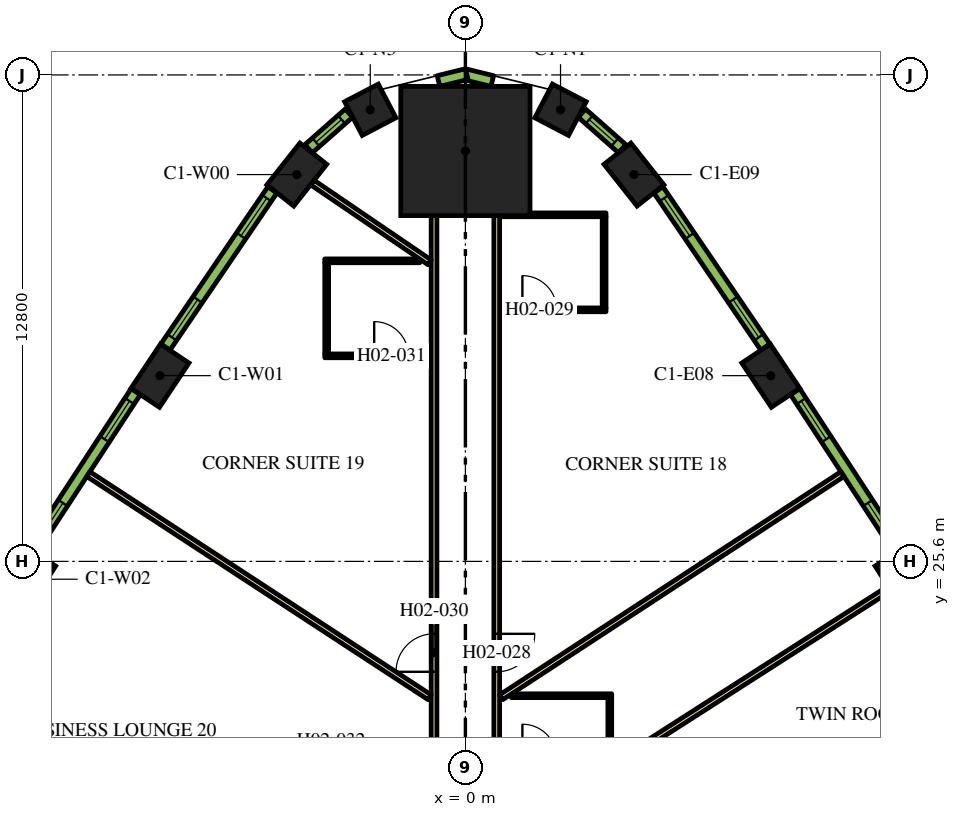
"""IFC4 building model, lengths in metres.
Left out: names, types, materials, properties, quantities, classifications, styles, units other than length and angle.
Written with IfcOpenShell. Run it as: python <this file> out.ifc"""

import sys

from ifc_helpers import new_model, si_unit, direction, frame, frame_2d, origin, origin_2d, place, context, subcontext, project, spatial, rectangle, extrude, element, fill, save


model = new_model("IFC4")
c1 = context("Model", 3, precision=1e-05, world=origin(), true_north=direction((0.0, 1.0)))
c2 = subcontext(c1, "Body", "Model", "MODEL_VIEW")
j1 = project(units=[si_unit("LENGTHUNIT", "METRE"), si_unit("PLANEANGLEUNIT", "RADIAN")], contexts=[c1])
p1 = place(None, origin())
s1 = spatial("IfcSite", under=j1, at=p1, CompositionType="ELEMENT")
p2 = place(p1, origin())
s2 = spatial("IfcBuilding", under=s1, at=p2, CompositionType="ELEMENT")
p3 = place(p2, frame((0.0, 0.0, 47.1)))
s3 = spatial("IfcBuildingStorey", under=s2, at=p3, CompositionType="ELEMENT", Elevation=47.1)
p4 = place(p3, frame((0.0, 36.399, 0.0), z_axis=(0.0, 0.0, 1.0), x_axis=(0.0, 1.0, 0.0)))
e1 = element("IfcColumn", 1, at=p4, inside=s3, PredefinedType="COLUMN", context=c2, shape_type="SweptSolid", body=[
    extrude(rectangle(XDim=3.4, YDim=3.4, at=origin_2d()), origin(), (0.0, 0.0, 1.0), 3.9),
])
for number, where, z_axis, x_axis in (
    (2, (11.539, 25.131, 0.0), (0.0, 0.0, 1.0), (-0.539, 0.842, 0.0)),
    (3, (8.037, 30.487, 0.0), (0.0, 0.0, 1.0), (-0.555, 0.832, 0.0)),
    (4, (4.436, 35.778, 0.0), (0.0, 0.0, 1.0), (-0.62, 0.784, 0.0)),
):
    element("IfcColumn", number, at=place(p3, frame(where, z_axis=z_axis, x_axis=x_axis)), inside=s3, PredefinedType="COLUMN", context=c2, shape_type="SweptSolid", body=[
        extrude(rectangle(XDim=1.4, YDim=0.9, at=origin_2d()), origin(), (0.0, 0.0, 1.0), 3.9),
    ])
for number, where, z_axis, x_axis in (
    (5, (2.503, 37.484, 0.0), (0.0, 0.0, 1.0), (-0.886, 0.464, 0.0)),
    (6, (-2.503, 37.484, 0.0), (0.0, 0.0, 1.0), (-0.886, -0.464, 0.0)),
):
    element("IfcColumn", number, at=place(p3, frame(where, z_axis=z_axis, x_axis=x_axis)), inside=s3, PredefinedType="COLUMN", context=c2, shape_type="SweptSolid", body=[
        extrude(rectangle(XDim=1.0, YDim=1.0, at=origin_2d()), origin(), (0.0, 0.0, 1.0), 3.9),
    ])
for number, where, z_axis, x_axis in (
    (7, (-4.436, 35.778, 0.0), (0.0, 0.0, 1.0), (-0.62, -0.784, 0.0)),
    (8, (-8.037, 30.487, 0.0), (0.0, 0.0, 1.0), (-0.555, -0.832, 0.0)),
    (9, (-11.539, 25.131, 0.0), (0.0, 0.0, 1.0), (-0.539, -0.842, 0.0)),
):
    element("IfcColumn", number, at=place(p3, frame(where, z_axis=z_axis, x_axis=x_axis)), inside=s3, PredefinedType="COLUMN", context=c2, shape_type="SweptSolid", body=[
        extrude(rectangle(XDim=1.4, YDim=0.9, at=origin_2d()), origin(), (0.0, 0.0, 1.0), 3.9),
    ])
p5 = place(p3, frame((0.825, 34.699, 0.0), z_axis=(0.0, 0.0, 1.0), x_axis=(0.0, -1.0, 0.0)))
e10 = element("IfcWall", 10, at=p5, inside=s3, PredefinedType="PARTITIONING", context=c2, shape_type="SweptSolid", body=[
    extrude(rectangle(XDim=16.144, YDim=0.15, at=frame_2d((8.072, 0.0))), origin(), (0.0, 0.0, 1.0), 2.75),
])
p6 = place(p5, frame((14.714, 0.0, 0.0)))
e11 = element("IfcOpeningElement", 11, at=p6, cuts=e10, PredefinedType="OPENING", context=c2, shape_type="SweptSolid", body=[
    extrude(rectangle(XDim=1.0, YDim=2.1, at=frame_2d((0.5, 1.05))), frame((0.0, 0.085, 0.0), z_axis=(0.0, -1.0, 0.0), x_axis=(1.0, 0.0, 0.0)), (0.0, 0.0, 1.0), 0.17),
])
p7 = place(p5, frame((11.005, 0.0, 0.0)))
e12 = element("IfcOpeningElement", 12, at=p7, cuts=e10, PredefinedType="OPENING", context=c2, shape_type="SweptSolid", body=[
    extrude(rectangle(XDim=1.0, YDim=2.1, at=frame_2d((0.5, 1.05))), frame((0.0, 0.085, 0.0), z_axis=(0.0, -1.0, 0.0), x_axis=(1.0, 0.0, 0.0)), (0.0, 0.0, 1.0), 0.17),
])
p8 = place(p3, frame((-0.825, 18.475, 0.0), z_axis=(0.0, 0.0, 1.0), x_axis=(0.0, 1.0, 0.0)))
e13 = element("IfcWall", 13, at=p8, inside=s3, PredefinedType="PARTITIONING", context=c2, shape_type="SweptSolid", body=[
    extrude(rectangle(XDim=16.224, YDim=0.15, at=frame_2d((8.112, 0.0))), origin(), (0.0, 0.0, 1.0), 2.75),
])
p9 = place(p8, frame((4.22, 0.0, 0.0)))
e14 = element("IfcOpeningElement", 14, at=p9, cuts=e13, PredefinedType="OPENING", context=c2, shape_type="SweptSolid", body=[
    extrude(rectangle(XDim=1.0, YDim=2.1, at=frame_2d((0.5, 1.05))), frame((0.0, 0.085, 0.0), z_axis=(0.0, -1.0, 0.0), x_axis=(1.0, 0.0, 0.0)), (0.0, 0.0, 1.0), 0.17),
])
p10 = place(p3, frame((-9.922, 27.896, 0.0), z_axis=(0.0, 0.0, 1.0), x_axis=(0.836970816595, -0.547247523675, 0.0)))
e15 = element("IfcWall", 15, at=p10, inside=s3, PredefinedType="PARTITIONING", context=c2, shape_type="SweptSolid", body=[
    extrude(rectangle(XDim=10.729, YDim=0.15, at=frame_2d((5.364, 0.0))), origin(), (0.0, 0.0, 1.0), 2.75),
])
p11 = place(p3, frame((-4.028, 35.569, 0.0), z_axis=(0.0, 0.0, 1.0), x_axis=(0.826730622998, -0.562597971021, 0.0)))
e16 = element("IfcWall", 16, at=p11, inside=s3, PredefinedType="PARTITIONING", context=c2, shape_type="SweptSolid", body=[
    extrude(rectangle(XDim=3.733, YDim=0.15, at=frame_2d((1.867, 0.0))), origin(), (0.0, 0.0, 1.0), 2.75),
])
p12 = place(p3, frame((9.922, 27.896, 0.0), z_axis=(0.0, 0.0, 1.0), x_axis=(-0.836970816595, -0.547247523675, 0.0)))
e17 = element("IfcWall", 17, at=p12, inside=s3, PredefinedType="PARTITIONING", context=c2, shape_type="SweptSolid", body=[
    extrude(rectangle(XDim=10.729, YDim=0.15, at=frame_2d((5.364, 0.0))), origin(), (0.0, 0.0, 1.0), 2.75),
])
p13 = place(p3, frame((11.16, 24.888, 0.0), z_axis=(0.0, 0.0, 1.0), x_axis=(-0.84199813156, -0.539480441211, 0.0)))
e18 = element("IfcWall", 18, at=p13, inside=s3, PredefinedType="PARTITIONING", context=c2, shape_type="SweptSolid", body=[
    extrude(rectangle(XDim=11.638, YDim=0.15, at=frame_2d((5.819, 0.0))), origin(), (0.0, 0.0, 1.0), 2.75),
])
p14 = place(p3, frame((3.8, 20.466, 0.0), z_axis=(0.0, 0.0, 1.0), x_axis=(0.0, 1.0, 0.0)))
e19 = element("IfcWall", 19, at=p14, inside=s3, PredefinedType="PARTITIONING", context=c2, shape_type="SweptSolid", body=[
    extrude(rectangle(XDim=1.55, YDim=0.1, at=frame_2d((0.775, 0.0))), origin(), (0.0, 0.0, 1.0), 2.75),
])
p15 = place(p3, frame((1.21, 22.066, 0.0), z_axis=(0.0, 0.0, 1.0), x_axis=(1.0, 0.0, 0.0)))
e20 = element("IfcWall", 20, at=p15, inside=s3, PredefinedType="PARTITIONING", context=c2, shape_type="SweptSolid", body=[
    extrude(rectangle(XDim=2.64, YDim=0.1, at=frame_2d((1.32, 0.0))), origin(), (0.0, 0.0, 1.0), 2.75),
])
p16 = place(p3, frame((0.9, 32.219, 0.0), z_axis=(0.0, 0.0, 1.0), x_axis=(1.0, 0.0, 0.0)))
e21 = element("IfcWall", 21, at=p16, inside=s3, PredefinedType="PARTITIONING", context=c2, shape_type="SweptSolid", body=[
    extrude(rectangle(XDim=2.8, YDim=0.1, at=frame_2d((1.4, 0.0))), origin(), (0.0, 0.0, 1.0), 2.75),
])
p17 = place(p16, frame((0.6, 0.0, 0.0)))
e22 = element("IfcOpeningElement", 22, at=p17, cuts=e21, PredefinedType="OPENING", context=c2, shape_type="SweptSolid", body=[
    extrude(rectangle(XDim=0.9, YDim=2.1, at=frame_2d((0.45, 1.05))), frame((0.0, 0.06, 0.0), z_axis=(0.0, -1.0, 0.0), x_axis=(1.0, 0.0, 0.0)), (0.0, 0.0, 1.0), 0.12),
])
p18 = place(p3, frame((3.65, 32.269, 0.0), z_axis=(0.0, 0.0, 1.0), x_axis=(0.0, 1.0, 0.0)))
e23 = element("IfcWall", 23, at=p18, inside=s3, PredefinedType="PARTITIONING", context=c2, shape_type="SweptSolid", body=[
    extrude(rectangle(XDim=2.4, YDim=0.1, at=frame_2d((1.2, 0.0))), origin(), (0.0, 0.0, 1.0), 2.75),
])
p19 = place(p3, frame((0.9, 34.719, 0.0), z_axis=(0.0, 0.0, 1.0), x_axis=(1.0, 0.0, 0.0)))
e24 = element("IfcWall", 24, at=p19, inside=s3, PredefinedType="PARTITIONING", context=c2, shape_type="SweptSolid", body=[
    extrude(rectangle(XDim=2.8, YDim=0.1, at=frame_2d((1.4, 0.0))), origin(), (0.0, 0.0, 1.0), 2.75),
])
p20 = place(p3, frame((-3.7, 31.009, 0.0), z_axis=(0.0, 0.0, 1.0), x_axis=(1.0, 0.0, 0.0)))
e25 = element("IfcWall", 25, at=p20, inside=s3, PredefinedType="PARTITIONING", context=c2, shape_type="SweptSolid", body=[
    extrude(rectangle(XDim=2.8, YDim=0.1, at=frame_2d((1.4, 0.0))), origin(), (0.0, 0.0, 1.0), 2.75),
])
p21 = place(p20, frame((1.3, 0.0, 0.0)))
e26 = element("IfcOpeningElement", 26, at=p21, cuts=e25, PredefinedType="OPENING", context=c2, shape_type="SweptSolid", body=[
    extrude(rectangle(XDim=0.9, YDim=2.1, at=frame_2d((0.45, 1.05))), frame((0.0, 0.06, 0.0), z_axis=(0.0, -1.0, 0.0), x_axis=(1.0, 0.0, 0.0)), (0.0, 0.0, 1.0), 0.12),
])
p22 = place(p3, frame((-3.65, 31.059, 0.0), z_axis=(0.0, 0.0, 1.0), x_axis=(0.0, 1.0, 0.0)))
e27 = element("IfcWall", 27, at=p22, inside=s3, PredefinedType="PARTITIONING", context=c2, shape_type="SweptSolid", body=[
    extrude(rectangle(XDim=2.4, YDim=0.1, at=frame_2d((1.2, 0.0))), origin(), (0.0, 0.0, 1.0), 2.75),
])
p23 = place(p3, frame((-1.2, 33.509, 0.0), z_axis=(0.0, 0.0, 1.0), x_axis=(-1.0, 0.0, 0.0)))
e28 = element("IfcWall", 28, at=p23, inside=s3, PredefinedType="PARTITIONING", context=c2, shape_type="SweptSolid", body=[
    extrude(rectangle(XDim=2.5, YDim=0.1, at=frame_2d((1.25, 0.0))), origin(), (0.0, 0.0, 1.0), 2.75),
])
p24 = place(p3, frame((11.411, 25.884, 0.0), z_axis=(0.0, 0.0, 1.0), x_axis=(-0.547204617628, 0.836998868845, 0.0)))
e29 = element("IfcWall", 29, at=p24, inside=s3, PredefinedType="SOLIDWALL", context=c2, shape_type="SweptSolid", body=[
    extrude(rectangle(XDim=4.998, YDim=0.29, at=frame_2d((2.499, 0.0))), origin(), (0.0, 0.0, 1.0), 3.65),
])
p25 = place(p24, frame((0.297, 0.0, 0.9)))
e30 = element("IfcOpeningElement", 30, at=p25, cuts=e29, PredefinedType="OPENING", context=c2, shape_type="SweptSolid", body=[
    extrude(rectangle(XDim=1.2, YDim=2.15, at=frame_2d((0.6, 1.075))), frame((0.0, 0.155, 0.0), z_axis=(0.0, -1.0, 0.0), x_axis=(1.0, 0.0, 0.0)), (0.0, 0.0, 1.0), 0.31),
])
p26 = place(p24, frame((3.501, 0.0, 0.9)))
e31 = element("IfcOpeningElement", 31, at=p26, cuts=e29, PredefinedType="OPENING", context=c2, shape_type="SweptSolid", body=[
    extrude(rectangle(XDim=1.2, YDim=2.15, at=frame_2d((0.6, 1.075))), frame((0.0, 0.155, 0.0), z_axis=(0.0, -1.0, 0.0), x_axis=(1.0, 0.0, 0.0)), (0.0, 0.0, 1.0), 0.31),
])
p27 = place(p3, frame((7.895, 31.238, 0.0), z_axis=(0.0, 0.0, 1.0), x_axis=(-0.562610153679, 0.826722332454, 0.0)))
e32 = element("IfcWall", 32, at=p27, inside=s3, PredefinedType="SOLIDWALL", context=c2, shape_type="SweptSolid", body=[
    extrude(rectangle(XDim=5.006, YDim=0.29, at=frame_2d((2.503, 0.0))), origin(), (0.0, 0.0, 1.0), 3.65),
])
p28 = place(p27, frame((0.31, 0.0, 0.9)))
e33 = element("IfcOpeningElement", 33, at=p28, cuts=e32, PredefinedType="OPENING", context=c2, shape_type="SweptSolid", body=[
    extrude(rectangle(XDim=1.2, YDim=2.15, at=frame_2d((0.6, 1.075))), frame((0.0, 0.155, 0.0), z_axis=(0.0, -1.0, 0.0), x_axis=(1.0, 0.0, 0.0)), (0.0, 0.0, 1.0), 0.31),
])
p29 = place(p27, frame((3.541, 0.0, 0.9)))
e34 = element("IfcOpeningElement", 34, at=p29, cuts=e32, PredefinedType="OPENING", context=c2, shape_type="SweptSolid", body=[
    extrude(rectangle(XDim=1.2, YDim=2.15, at=frame_2d((0.6, 1.075))), frame((0.0, 0.155, 0.0), z_axis=(0.0, -1.0, 0.0), x_axis=(1.0, 0.0, 0.0)), (0.0, 0.0, 1.0), 0.31),
])
p30 = place(p3, frame((4.125, 36.459, 0.0), z_axis=(0.0, 0.0, 1.0), x_axis=(-0.749812680302, 0.661650167731, 0.0)))
e35 = element("IfcWall", 35, at=p30, inside=s3, PredefinedType="SOLIDWALL", context=c2, shape_type="SweptSolid", body=[
    extrude(rectangle(XDim=1.415, YDim=0.29, at=frame_2d((0.708, 0.0))), origin(), (0.0, 0.0, 1.0), 3.65),
])
p31 = place(p30, frame((0.258, 0.0, 0.9)))
e36 = element("IfcOpeningElement", 36, at=p31, cuts=e35, PredefinedType="OPENING", context=c2, shape_type="SweptSolid", body=[
    extrude(rectangle(XDim=0.9, YDim=2.15, at=frame_2d((0.45, 1.075))), frame((0.0, 0.155, 0.0), z_axis=(0.0, -1.0, 0.0), x_axis=(1.0, 0.0, 0.0)), (0.0, 0.0, 1.0), 0.31),
])
for number, where, z_axis, x_axis in (
    (37, (0.707, 38.239, 0.0), (0.0, 0.0, 1.0), (-0.971, 0.238, 0.0)),
    (38, (0.035, 38.421, 0.0), (0.0, 0.0, 1.0), (-0.971, -0.238, 0.0)),
):
    element("IfcWall", number, at=place(p3, frame(where, z_axis=z_axis, x_axis=x_axis)), inside=s3, PredefinedType="SOLIDWALL", context=c2, shape_type="SweptSolid", body=[
        extrude(rectangle(XDim=0.764, YDim=0.29, at=frame_2d((0.382, 0.0))), origin(), (0.0, 0.0, 1.0), 3.65),
    ])
p32 = place(p3, frame((-3.064, 37.395, 0.0), z_axis=(0.0, 0.0, 1.0), x_axis=(-0.749812680302, -0.661650167731, 0.0)))
e39 = element("IfcWall", 39, at=p32, inside=s3, PredefinedType="SOLIDWALL", context=c2, shape_type="SweptSolid", body=[
    extrude(rectangle(XDim=1.415, YDim=0.29, at=frame_2d((0.708, 0.0))), origin(), (0.0, 0.0, 1.0), 3.65),
])
p33 = place(p32, frame((0.258, 0.0, 0.9)))
e40 = element("IfcOpeningElement", 40, at=p33, cuts=e39, PredefinedType="OPENING", context=c2, shape_type="SweptSolid", body=[
    extrude(rectangle(XDim=0.9, YDim=2.15, at=frame_2d((0.45, 1.075))), frame((0.0, 0.155, 0.0), z_axis=(0.0, -1.0, 0.0), x_axis=(1.0, 0.0, 0.0)), (0.0, 0.0, 1.0), 0.31),
])
p34 = place(p3, frame((-5.078, 35.376, 0.0), z_axis=(0.0, 0.0, 1.0), x_axis=(-0.562610153679, -0.826722332454, 0.0)))
e41 = element("IfcWall", 41, at=p34, inside=s3, PredefinedType="SOLIDWALL", context=c2, shape_type="SweptSolid", body=[
    extrude(rectangle(XDim=5.006, YDim=0.29, at=frame_2d((2.503, 0.0))), origin(), (0.0, 0.0, 1.0), 3.65),
])
p35 = place(p34, frame((0.265, 0.0, 0.9)))
e42 = element("IfcOpeningElement", 42, at=p35, cuts=e41, PredefinedType="OPENING", context=c2, shape_type="SweptSolid", body=[
    extrude(rectangle(XDim=1.2, YDim=2.15, at=frame_2d((0.6, 1.075))), frame((0.0, 0.155, 0.0), z_axis=(0.0, -1.0, 0.0), x_axis=(1.0, 0.0, 0.0)), (0.0, 0.0, 1.0), 0.31),
])
p36 = place(p34, frame((3.495, 0.0, 0.9)))
e43 = element("IfcOpeningElement", 43, at=p36, cuts=e41, PredefinedType="OPENING", context=c2, shape_type="SweptSolid", body=[
    extrude(rectangle(XDim=1.2, YDim=2.15, at=frame_2d((0.6, 1.075))), frame((0.0, 0.155, 0.0), z_axis=(0.0, -1.0, 0.0), x_axis=(1.0, 0.0, 0.0)), (0.0, 0.0, 1.0), 0.31),
])
p37 = place(p3, frame((-8.676, 30.068, 0.0), z_axis=(0.0, 0.0, 1.0), x_axis=(-0.547204617628, -0.836998868845, 0.0)))
e44 = element("IfcWall", 44, at=p37, inside=s3, PredefinedType="SOLIDWALL", context=c2, shape_type="SweptSolid", body=[
    extrude(rectangle(XDim=4.998, YDim=0.29, at=frame_2d((2.499, 0.0))), origin(), (0.0, 0.0, 1.0), 3.65),
])
p38 = place(p37, frame((0.297, 0.0, 0.9)))
e45 = element("IfcOpeningElement", 45, at=p38, cuts=e44, PredefinedType="OPENING", context=c2, shape_type="SweptSolid", body=[
    extrude(rectangle(XDim=1.2, YDim=2.15, at=frame_2d((0.6, 1.075))), frame((0.0, 0.155, 0.0), z_axis=(0.0, -1.0, 0.0), x_axis=(1.0, 0.0, 0.0)), (0.0, 0.0, 1.0), 0.31),
])
p39 = place(p37, frame((3.501, 0.0, 0.9)))
e46 = element("IfcOpeningElement", 46, at=p39, cuts=e44, PredefinedType="OPENING", context=c2, shape_type="SweptSolid", body=[
    extrude(rectangle(XDim=1.2, YDim=2.15, at=frame_2d((0.6, 1.075))), frame((0.0, 0.155, 0.0), z_axis=(0.0, -1.0, 0.0), x_axis=(1.0, 0.0, 0.0)), (0.0, 0.0, 1.0), 0.31),
])
p40 = place(p7, origin())
e47 = element("IfcDoor", 47, at=p40, inside=s3, OperationType="SINGLE_SWING_RIGHT", PredefinedType="DOOR", context=c2, shape_type="SweptSolid", body=[
    extrude(rectangle(XDim=1.0, YDim=2.1, at=frame_2d((0.5, 1.05))), frame((0.0, 0.025, 0.0), z_axis=(0.0, -1.0, 0.0), x_axis=(1.0, 0.0, 0.0)), (0.0, 0.0, 1.0), 0.05),
])
fill(e12, e47)
p41 = place(p17, origin())
e48 = element("IfcDoor", 48, at=p41, inside=s3, OperationType="SINGLE_SWING_RIGHT", PredefinedType="DOOR", context=c2, shape_type="SweptSolid", body=[
    extrude(rectangle(XDim=0.9, YDim=2.1, at=frame_2d((0.45, 1.05))), frame((0.0, 0.025, 0.0), z_axis=(0.0, -1.0, 0.0), x_axis=(1.0, 0.0, 0.0)), (0.0, 0.0, 1.0), 0.05),
])
fill(e22, e48)
p42 = place(p9, origin())
e49 = element("IfcDoor", 49, at=p42, inside=s3, OperationType="SINGLE_SWING_LEFT", PredefinedType="DOOR", context=c2, shape_type="SweptSolid", body=[
    extrude(rectangle(XDim=1.0, YDim=2.1, at=frame_2d((0.5, 1.05))), frame((0.0, 0.025, 0.0), z_axis=(0.0, -1.0, 0.0), x_axis=(1.0, 0.0, 0.0)), (0.0, 0.0, 1.0), 0.05),
])
fill(e14, e49)
p43 = place(p21, origin())
e50 = element("IfcDoor", 50, at=p43, inside=s3, OperationType="SINGLE_SWING_LEFT", PredefinedType="DOOR", context=c2, shape_type="SweptSolid", body=[
    extrude(rectangle(XDim=0.9, YDim=2.1, at=frame_2d((0.45, 1.05))), frame((0.0, 0.025, 0.0), z_axis=(0.0, -1.0, 0.0), x_axis=(1.0, 0.0, 0.0)), (0.0, 0.0, 1.0), 0.05),
])
fill(e26, e50)
p44 = place(p25, origin())
e51 = element("IfcWindow", 51, at=p44, inside=s3, PartitioningType="DOUBLE_PANEL_VERTICAL", PredefinedType="WINDOW", context=c2, shape_type="SweptSolid", body=[
    extrude(rectangle(XDim=1.2, YDim=2.15, at=frame_2d((0.6, 1.075))), frame((0.0, 0.015, 0.0), z_axis=(0.0, -1.0, 0.0), x_axis=(1.0, 0.0, 0.0)), (0.0, 0.0, 1.0), 0.06),
])
fill(e30, e51)
p45 = place(p26, origin())
e52 = element("IfcWindow", 52, at=p45, inside=s3, PartitioningType="DOUBLE_PANEL_VERTICAL", PredefinedType="WINDOW", context=c2, shape_type="SweptSolid", body=[
    extrude(rectangle(XDim=1.2, YDim=2.15, at=frame_2d((0.6, 1.075))), frame((0.0, 0.015, 0.0), z_axis=(0.0, -1.0, 0.0), x_axis=(1.0, 0.0, 0.0)), (0.0, 0.0, 1.0), 0.06),
])
fill(e31, e52)
p46 = place(p28, origin())
e53 = element("IfcWindow", 53, at=p46, inside=s3, PartitioningType="DOUBLE_PANEL_VERTICAL", PredefinedType="WINDOW", context=c2, shape_type="SweptSolid", body=[
    extrude(rectangle(XDim=1.2, YDim=2.15, at=frame_2d((0.6, 1.075))), frame((0.0, 0.015, 0.0), z_axis=(0.0, -1.0, 0.0), x_axis=(1.0, 0.0, 0.0)), (0.0, 0.0, 1.0), 0.06),
])
fill(e33, e53)
p47 = place(p29, origin())
e54 = element("IfcWindow", 54, at=p47, inside=s3, PartitioningType="DOUBLE_PANEL_VERTICAL", PredefinedType="WINDOW", context=c2, shape_type="SweptSolid", body=[
    extrude(rectangle(XDim=1.2, YDim=2.15, at=frame_2d((0.6, 1.075))), frame((0.0, 0.015, 0.0), z_axis=(0.0, -1.0, 0.0), x_axis=(1.0, 0.0, 0.0)), (0.0, 0.0, 1.0), 0.06),
])
fill(e34, e54)
p48 = place(p31, origin())
e55 = element("IfcWindow", 55, at=p48, inside=s3, PartitioningType="SINGLE_PANEL", PredefinedType="WINDOW", context=c2, shape_type="SweptSolid", body=[
    extrude(rectangle(XDim=0.9, YDim=2.15, at=frame_2d((0.45, 1.075))), frame((0.0, 0.015, 0.0), z_axis=(0.0, -1.0, 0.0), x_axis=(1.0, 0.0, 0.0)), (0.0, 0.0, 1.0), 0.06),
])
fill(e36, e55)
p49 = place(p33, origin())
e56 = element("IfcWindow", 56, at=p49, inside=s3, PartitioningType="SINGLE_PANEL", PredefinedType="WINDOW", context=c2, shape_type="SweptSolid", body=[
    extrude(rectangle(XDim=0.9, YDim=2.15, at=frame_2d((0.45, 1.075))), frame((0.0, 0.015, 0.0), z_axis=(0.0, -1.0, 0.0), x_axis=(1.0, 0.0, 0.0)), (0.0, 0.0, 1.0), 0.06),
])
fill(e40, e56)
p50 = place(p35, origin())
e57 = element("IfcWindow", 57, at=p50, inside=s3, PartitioningType="DOUBLE_PANEL_VERTICAL", PredefinedType="WINDOW", context=c2, shape_type="SweptSolid", body=[
    extrude(rectangle(XDim=1.2, YDim=2.15, at=frame_2d((0.6, 1.075))), frame((0.0, 0.015, 0.0), z_axis=(0.0, -1.0, 0.0), x_axis=(1.0, 0.0, 0.0)), (0.0, 0.0, 1.0), 0.06),
])
fill(e42, e57)
p51 = place(p36, origin())
e58 = element("IfcWindow", 58, at=p51, inside=s3, PartitioningType="DOUBLE_PANEL_VERTICAL", PredefinedType="WINDOW", context=c2, shape_type="SweptSolid", body=[
    extrude(rectangle(XDim=1.2, YDim=2.15, at=frame_2d((0.6, 1.075))), frame((0.0, 0.015, 0.0), z_axis=(0.0, -1.0, 0.0), x_axis=(1.0, 0.0, 0.0)), (0.0, 0.0, 1.0), 0.06),
])
fill(e43, e58)
p52 = place(p38, origin())
e59 = element("IfcWindow", 59, at=p52, inside=s3, PartitioningType="DOUBLE_PANEL_VERTICAL", PredefinedType="WINDOW", context=c2, shape_type="SweptSolid", body=[
    extrude(rectangle(XDim=1.2, YDim=2.15, at=frame_2d((0.6, 1.075))), frame((0.0, 0.015, 0.0), z_axis=(0.0, -1.0, 0.0), x_axis=(1.0, 0.0, 0.0)), (0.0, 0.0, 1.0), 0.06),
])
fill(e45, e59)
p53 = place(p39, origin())
e60 = element("IfcWindow", 60, at=p53, inside=s3, PartitioningType="DOUBLE_PANEL_VERTICAL", PredefinedType="WINDOW", context=c2, shape_type="SweptSolid", body=[
    extrude(rectangle(XDim=1.2, YDim=2.15, at=frame_2d((0.6, 1.075))), frame((0.0, 0.015, 0.0), z_axis=(0.0, -1.0, 0.0), x_axis=(1.0, 0.0, 0.0)), (0.0, 0.0, 1.0), 0.06),
])
fill(e46, e60)
save(model, sys.argv[1])
